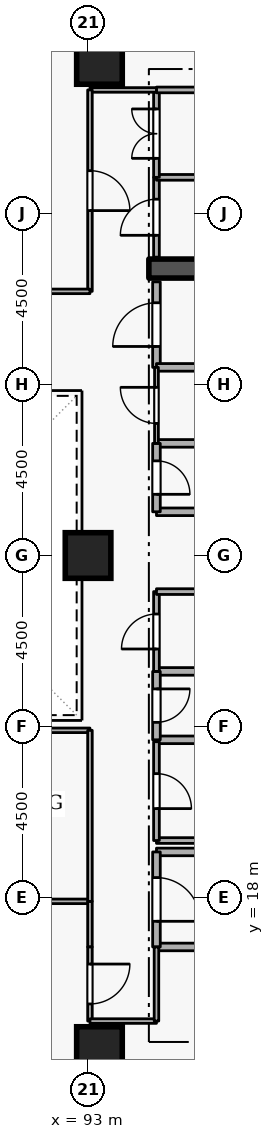
"""IFC4 building model, lengths in metres.
Left out: names, types, materials, properties, quantities, classifications, styles, units other than length and angle.
Written with IfcOpenShell. Run it as: python <this file> out.ifc"""

import sys

from ifc_helpers import new_model, si_unit, direction, frame, frame_2d, origin, origin_2d, place, context, subcontext, project, spatial, rectangle, extrude, element, fill, save


model = new_model("IFC4")
c1 = context("Model", 3, precision=1e-05, world=origin(), true_north=direction((0.0, 1.0)))
c2 = subcontext(c1, "Body", "Model", "MODEL_VIEW")
j1 = project(units=[si_unit("LENGTHUNIT", "METRE"), si_unit("PLANEANGLEUNIT", "RADIAN")], contexts=[c1])
p1 = place(None, origin())
s1 = spatial("IfcSite", under=j1, at=p1, CompositionType="ELEMENT")
p2 = place(p1, origin())
s2 = spatial("IfcBuilding", under=s1, at=p2, CompositionType="ELEMENT")
p3 = place(p2, frame((0.0, 0.0, 134.1)))
s3 = spatial("IfcBuildingStorey", under=s2, at=p3, CompositionType="ELEMENT", Elevation=134.1)
p4 = place(p3, frame((94.6, 34.55, 0.0), z_axis=(0.0, 0.0, 1.0), x_axis=(1.0, 0.0, 0.0)))
e1 = element("IfcWall", 1, at=p4, inside=s3, PredefinedType="SHEAR", context=c2, shape_type="SweptSolid", body=[
    extrude(rectangle(XDim=5.8, YDim=0.5, at=frame_2d((2.9, 0.0))), origin(), (0.0, 0.0, 1.0), 3.6),
])
for number, where, z_axis, x_axis in (
    (2, (93.3, 14.0, 0.0), (0.0, 0.0, 1.0), (1.0, 0.0, 0.0)),
    (3, (93.3, 40.0, 0.0), (0.0, 0.0, 1.0), (1.0, 0.0, 0.0)),
    (4, (93.0, 27.0, 0.0), (0.0, 0.0, 1.0), (1.0, 0.0, 0.0)),
):
    element("IfcColumn", number, at=place(p3, frame(where, z_axis=z_axis, x_axis=x_axis)), inside=s3, PredefinedType="COLUMN", context=c2, shape_type="SweptSolid", body=[
        extrude(rectangle(XDim=1.2, YDim=1.2, at=origin_2d()), origin(), (0.0, 0.0, 1.0), 3.6),
    ])
p5 = place(p3, frame((94.8, 16.7, 0.0), z_axis=(0.0, 0.0, 1.0), x_axis=(1.0, 0.0, 0.0)))
e5 = element("IfcWall", 5, at=p5, inside=s3, PredefinedType="STANDARD", context=c2, shape_type="SweptSolid", body=[
    extrude(rectangle(XDim=5.7, YDim=0.2, at=frame_2d((2.85, 0.0))), origin(), (0.0, 0.0, 1.0), 3.34),
])
p6 = place(p3, frame((97.1, 19.2, 0.0), z_axis=(0.0, 0.0, 1.0), x_axis=(-1.0, 0.0, 0.0)))
e6 = element("IfcWall", 6, at=p6, inside=s3, PredefinedType="STANDARD", context=c2, shape_type="SweptSolid", body=[
    extrude(rectangle(XDim=2.3, YDim=0.2, at=frame_2d((1.15, 0.0))), origin(), (0.0, 0.0, 1.0), 2.545),
])
p7 = place(p3, frame((94.8, 19.2, 0.0), z_axis=(0.0, 0.0, 1.0), x_axis=(0.0, -1.0, 0.0)))
e7 = element("IfcWall", 7, at=p7, inside=s3, PredefinedType="STANDARD", context=c2, shape_type="SweptSolid", body=[
    extrude(rectangle(XDim=2.5, YDim=0.2, at=frame_2d((1.25, 0.0))), origin(), (0.0, 0.0, 1.0), 3.34),
])
p8 = place(p7, frame((0.675, 0.0, 0.0)))
e8 = element("IfcOpeningElement", 8, at=p8, cuts=e7, PredefinedType="OPENING", context=c2, shape_type="SweptSolid", body=[
    extrude(rectangle(XDim=1.15, YDim=2.1, at=frame_2d((0.575, 1.05))), frame((0.0, 0.11, 0.0), z_axis=(0.0, -1.0, 0.0), x_axis=(1.0, 0.0, 0.0)), (0.0, 0.0, 1.0), 0.22),
])
for number, where, z_axis, x_axis in (
    (9, (94.8, 28.15, 0.0), (0.0, 0.0, 1.0), (1.0, 0.0, 0.0)),
    (10, (96.85, 29.95, 0.0), (0.0, 0.0, 1.0), (-1.0, 0.0, 0.0)),
):
    element("IfcWall", number, at=place(p3, frame(where, z_axis=z_axis, x_axis=x_axis)), inside=s3, PredefinedType="STANDARD", context=c2, shape_type="SweptSolid", body=[
        extrude(rectangle(XDim=2.05, YDim=0.2, at=frame_2d((1.025, 0.0))), origin(), (0.0, 0.0, 1.0), 3.34),
    ])
p9 = place(p3, frame((94.8, 29.95, 0.0), z_axis=(0.0, 0.0, 1.0), x_axis=(0.0, -1.0, 0.0)))
e11 = element("IfcWall", 11, at=p9, inside=s3, PredefinedType="STANDARD", context=c2, shape_type="SweptSolid", body=[
    extrude(rectangle(XDim=1.8, YDim=0.2, at=frame_2d((0.9, 0.0))), origin(), (0.0, 0.0, 1.0), 3.34),
])
p10 = place(p9, frame((0.46, 0.0, 0.0)))
e12 = element("IfcOpeningElement", 12, at=p10, cuts=e11, PredefinedType="OPENING", context=c2, shape_type="SweptSolid", body=[
    extrude(rectangle(XDim=0.88, YDim=2.04, at=frame_2d((0.44, 1.02))), frame((0.0, 0.11, 0.0), z_axis=(0.0, -1.0, 0.0), x_axis=(1.0, 0.0, 0.0)), (0.0, 0.0, 1.0), 0.22),
])
for number, where, z_axis, x_axis in (
    (13, (94.8, 22.15, 0.0), (0.0, 0.0, 1.0), (1.0, 0.0, 0.0)),
    (14, (96.85, 23.95, 0.0), (0.0, 0.0, 1.0), (-1.0, 0.0, 0.0)),
):
    element("IfcWall", number, at=place(p3, frame(where, z_axis=z_axis, x_axis=x_axis)), inside=s3, PredefinedType="STANDARD", context=c2, shape_type="SweptSolid", body=[
        extrude(rectangle(XDim=2.05, YDim=0.2, at=frame_2d((1.025, 0.0))), origin(), (0.0, 0.0, 1.0), 3.34),
    ])
p11 = place(p3, frame((94.8, 23.95, 0.0), z_axis=(0.0, 0.0, 1.0), x_axis=(0.0, -1.0, 0.0)))
e15 = element("IfcWall", 15, at=p11, inside=s3, PredefinedType="STANDARD", context=c2, shape_type="SweptSolid", body=[
    extrude(rectangle(XDim=1.8, YDim=0.2, at=frame_2d((0.9, 0.0))), origin(), (0.0, 0.0, 1.0), 3.34),
])
p12 = place(p11, frame((0.46, 0.0, 0.0)))
e16 = element("IfcOpeningElement", 16, at=p12, cuts=e15, PredefinedType="OPENING", context=c2, shape_type="SweptSolid", body=[
    extrude(rectangle(XDim=0.88, YDim=2.04, at=frame_2d((0.44, 1.02))), frame((0.0, 0.11, 0.0), z_axis=(0.0, -1.0, 0.0), x_axis=(1.0, 0.0, 0.0)), (0.0, 0.0, 1.0), 0.22),
])
p13 = place(p3, frame((94.8, 31.95, 0.0), z_axis=(0.0, 0.0, 1.0), x_axis=(0.0, 1.0, 0.0)))
e17 = element("IfcWall", 17, at=p13, inside=s3, PredefinedType="STANDARD", context=c2, shape_type="SweptSolid", body=[
    extrude(rectangle(XDim=2.25, YDim=0.2, at=frame_2d((1.125, 0.0))), origin(), (0.0, 0.0, 1.0), 3.34),
])
p14 = place(p13, frame((0.55, 0.0, 0.0)))
e18 = element("IfcOpeningElement", 18, at=p14, cuts=e17, PredefinedType="OPENING", context=c2, shape_type="SweptSolid", body=[
    extrude(rectangle(XDim=1.15, YDim=2.1, at=frame_2d((0.575, 1.05))), frame((0.0, 0.11, 0.0), z_axis=(0.0, -1.0, 0.0), x_axis=(1.0, 0.0, 0.0)), (0.0, 0.0, 1.0), 0.22),
])
p15 = place(p3, frame((96.85, 31.95, 0.0), z_axis=(0.0, 0.0, 1.0), x_axis=(-1.0, 0.0, 0.0)))
e19 = element("IfcWall", 19, at=p15, inside=s3, PredefinedType="STANDARD", context=c2, shape_type="SweptSolid", body=[
    extrude(rectangle(XDim=2.05, YDim=0.2, at=frame_2d((1.025, 0.0))), origin(), (0.0, 0.0, 1.0), 3.34),
])
p16 = place(p3, frame((94.8, 19.5, 0.0), z_axis=(0.0, 0.0, 1.0), x_axis=(1.0, 0.0, 0.0)))
e20 = element("IfcWall", 20, at=p16, inside=s3, PredefinedType="PARTITIONING", context=c2, shape_type="SweptSolid", body=[
    extrude(rectangle(XDim=2.05, YDim=0.15, at=frame_2d((1.025, 0.0))), origin(), (0.0, 0.0, 1.0), 2.545),
])
p17 = place(p3, frame((94.8, 22.1, 0.0), z_axis=(0.0, 0.0, 1.0), x_axis=(0.0, -1.0, 0.0)))
e21 = element("IfcWall", 21, at=p17, inside=s3, PredefinedType="PARTITIONING", context=c2, shape_type="SweptSolid", body=[
    extrude(rectangle(XDim=2.6, YDim=0.15, at=frame_2d((1.3, 0.0))), origin(), (0.0, 0.0, 1.0), 3.34),
])
p18 = place(p17, frame((0.84, 0.0, 0.0)))
e22 = element("IfcOpeningElement", 22, at=p18, cuts=e21, PredefinedType="OPENING", context=c2, shape_type="SweptSolid", body=[
    extrude(rectangle(XDim=0.92, YDim=2.08, at=frame_2d((0.46, 1.04))), frame((0.0, 0.085, 0.0), z_axis=(0.0, -1.0, 0.0), x_axis=(1.0, 0.0, 0.0)), (0.0, 0.0, 1.0), 0.17),
])
p19 = place(p3, frame((94.8, 23.95, 0.0), z_axis=(0.0, 0.0, 1.0), x_axis=(0.0, 1.0, 0.0)))
e23 = element("IfcWall", 23, at=p19, inside=s3, PredefinedType="PARTITIONING", context=c2, shape_type="SweptSolid", body=[
    extrude(rectangle(XDim=2.1, YDim=0.15, at=frame_2d((1.05, 0.0))), origin(), (0.0, 0.0, 1.0), 3.34),
])
p20 = place(p19, frame((0.59, 0.0, 0.0)))
e24 = element("IfcOpeningElement", 24, at=p20, cuts=e23, PredefinedType="OPENING", context=c2, shape_type="SweptSolid", body=[
    extrude(rectangle(XDim=0.92, YDim=2.08, at=frame_2d((0.46, 1.04))), frame((0.0, 0.085, 0.0), z_axis=(0.0, -1.0, 0.0), x_axis=(1.0, 0.0, 0.0)), (0.0, 0.0, 1.0), 0.17),
])
p21 = place(p3, frame((94.8, 26.05, 0.0), z_axis=(0.0, 0.0, 1.0), x_axis=(1.0, 0.0, 0.0)))
e25 = element("IfcWall", 25, at=p21, inside=s3, PredefinedType="PARTITIONING", context=c2, shape_type="SweptSolid", body=[
    extrude(rectangle(XDim=2.05, YDim=0.15, at=frame_2d((1.025, 0.0))), origin(), (0.0, 0.0, 1.0), 3.34),
])
p22 = place(p3, frame((94.8, 29.95, 0.0), z_axis=(0.0, 0.0, 1.0), x_axis=(0.0, 1.0, 0.0)))
e26 = element("IfcWall", 26, at=p22, inside=s3, PredefinedType="PARTITIONING", context=c2, shape_type="SweptSolid", body=[
    extrude(rectangle(XDim=2.0, YDim=0.1, at=frame_2d((1.0, 0.0))), origin(), (0.0, 0.0, 1.0), 3.34),
])
p23 = place(p22, frame((0.525, 0.0, 0.0)))
e27 = element("IfcOpeningElement", 27, at=p23, cuts=e26, PredefinedType="OPENING", context=c2, shape_type="SweptSolid", body=[
    extrude(rectangle(XDim=0.95, YDim=2.1, at=frame_2d((0.475, 1.05))), frame((0.0, 0.06, 0.0), z_axis=(0.0, -1.0, 0.0), x_axis=(1.0, 0.0, 0.0)), (0.0, 0.0, 1.0), 0.12),
])
p24 = place(p3, frame((94.8, 34.85, 0.0), z_axis=(0.0, 0.0, 1.0), x_axis=(0.0, 1.0, 0.0)))
e28 = element("IfcWall", 28, at=p24, inside=s3, PredefinedType="PARTITIONING", context=c2, shape_type="SweptSolid", body=[
    extrude(rectangle(XDim=2.1, YDim=0.15, at=frame_2d((1.05, 0.0))), origin(), (0.0, 0.0, 1.0), 3.34),
])
p25 = place(p24, frame((0.575, 0.0, 0.0)))
e29 = element("IfcOpeningElement", 29, at=p25, cuts=e28, PredefinedType="OPENING", context=c2, shape_type="SweptSolid", body=[
    extrude(rectangle(XDim=0.95, YDim=2.1, at=frame_2d((0.475, 1.05))), frame((0.0, 0.085, 0.0), z_axis=(0.0, -1.0, 0.0), x_axis=(1.0, 0.0, 0.0)), (0.0, 0.0, 1.0), 0.17),
])
p26 = place(p3, frame((94.8, 36.95, 0.0), z_axis=(0.0, 0.0, 1.0), x_axis=(1.0, 0.0, 0.0)))
e30 = element("IfcWall", 30, at=p26, inside=s3, PredefinedType="PARTITIONING", context=c2, shape_type="SweptSolid", body=[
    extrude(rectangle(XDim=5.65, YDim=0.15, at=frame_2d((2.825, 0.0))), origin(), (0.0, 0.0, 1.0), 3.34),
])
p27 = place(p3, frame((94.8, 36.95, 0.0), z_axis=(0.0, 0.0, 1.0), x_axis=(0.0, 1.0, 0.0)))
e31 = element("IfcWall", 31, at=p27, inside=s3, PredefinedType="PARTITIONING", context=c2, shape_type="SweptSolid", body=[
    extrude(rectangle(XDim=2.3, YDim=0.15, at=frame_2d((1.15, 0.0))), origin(), (0.0, 0.0, 1.0), 3.34),
])
p28 = place(p27, frame((0.5, 0.0, 0.0)))
e32 = element("IfcOpeningElement", 32, at=p28, cuts=e31, PredefinedType="OPENING", context=c2, shape_type="SweptSolid", body=[
    extrude(rectangle(XDim=1.3, YDim=2.12, at=frame_2d((0.65, 1.06))), frame((0.0, 0.085, 0.0), z_axis=(0.0, -1.0, 0.0), x_axis=(1.0, 0.0, 0.0)), (0.0, 0.0, 1.0), 0.17),
])
p29 = place(p3, frame((94.8, 39.25, 0.0), z_axis=(0.0, 0.0, 1.0), x_axis=(1.0, 0.0, 0.0)))
e33 = element("IfcWall", 33, at=p29, inside=s3, PredefinedType="PARTITIONING", context=c2, shape_type="SweptSolid", body=[
    extrude(rectangle(XDim=5.65, YDim=0.15, at=frame_2d((2.825, 0.0))), origin(), (0.0, 0.0, 1.0), 3.34),
])
p30 = place(p3, frame((88.5, 17.9, 0.0), z_axis=(0.0, 0.0, 1.0), x_axis=(1.0, 0.0, 0.0)))
e34 = element("IfcWall", 34, at=p30, inside=s3, PredefinedType="PARTITIONING", context=c2, shape_type="SweptSolid", body=[
    extrude(rectangle(XDim=4.55, YDim=0.12, at=frame_2d((2.275, 0.0))), origin(), (0.0, 0.0, 1.0), 3.34),
])
p31 = place(p3, frame((93.05, 17.9, 0.0), z_axis=(0.0, 0.0, 1.0), x_axis=(0.0, -1.0, 0.0)))
e35 = element("IfcWall", 35, at=p31, inside=s3, PredefinedType="PARTITIONING", context=c2, shape_type="SweptSolid", body=[
    extrude(rectangle(XDim=1.2, YDim=0.12, at=frame_2d((0.6, 0.0))), origin(), (0.0, 0.0, 1.0), 3.34),
])
p32 = place(p3, frame((93.05, 16.7, 0.0), z_axis=(0.0, 0.0, 1.0), x_axis=(0.0, -1.0, 0.0)))
e36 = element("IfcWall", 36, at=p32, inside=s3, PredefinedType="PARTITIONING", context=c2, shape_type="SweptSolid", body=[
    extrude(rectangle(XDim=1.95, YDim=0.12, at=frame_2d((0.975, 0.0))), origin(), (0.0, 0.0, 1.0), 3.34),
])
p33 = place(p32, frame((0.45, 0.0, 0.0)))
e37 = element("IfcOpeningElement", 37, at=p33, cuts=e36, PredefinedType="OPENING", context=c2, shape_type="SweptSolid", body=[
    extrude(rectangle(XDim=1.05, YDim=2.1, at=frame_2d((0.525, 1.05))), frame((0.0, 0.07, 0.0), z_axis=(0.0, -1.0, 0.0), x_axis=(1.0, 0.0, 0.0)), (0.0, 0.0, 1.0), 0.14),
])
p34 = place(p3, frame((93.05, 14.75, 0.0), z_axis=(0.0, 0.0, 1.0), x_axis=(1.0, 0.0, 0.0)))
e38 = element("IfcWall", 38, at=p34, inside=s3, PredefinedType="PARTITIONING", context=c2, shape_type="SweptSolid", body=[
    extrude(rectangle(XDim=1.75, YDim=0.12, at=frame_2d((0.875, 0.0))), origin(), (0.0, 0.0, 1.0), 3.34),
])
p35 = place(p3, frame((94.8, 14.75, 0.0), z_axis=(0.0, 0.0, 1.0), x_axis=(0.0, 1.0, 0.0)))
e39 = element("IfcWall", 39, at=p35, inside=s3, PredefinedType="PARTITIONING", context=c2, shape_type="SweptSolid", body=[
    extrude(rectangle(XDim=1.95, YDim=0.12, at=frame_2d((0.975, 0.0))), origin(), (0.0, 0.0, 1.0), 3.34),
])
p36 = place(p3, frame((83.95, 22.4, 0.0), z_axis=(0.0, 0.0, 1.0), x_axis=(1.0, 0.0, 0.0)))
e40 = element("IfcWall", 40, at=p36, inside=s3, PredefinedType="PARTITIONING", context=c2, shape_type="SweptSolid", body=[
    extrude(rectangle(XDim=9.1, YDim=0.12, at=frame_2d((4.55, 0.0))), origin(), (0.0, 0.0, 1.0), 3.34),
])
p37 = place(p3, frame((93.05, 22.4, 0.0), z_axis=(0.0, 0.0, 1.0), x_axis=(0.0, -1.0, 0.0)))
e41 = element("IfcWall", 41, at=p37, inside=s3, PredefinedType="PARTITIONING", context=c2, shape_type="SweptSolid", body=[
    extrude(rectangle(XDim=4.5, YDim=0.12, at=frame_2d((2.25, 0.0))), origin(), (0.0, 0.0, 1.0), 3.34),
])
p38 = place(p3, frame((94.8, 39.25, 0.0), z_axis=(0.0, 0.0, 1.0), x_axis=(-1.0, 0.0, 0.0)))
e42 = element("IfcWall", 42, at=p38, inside=s3, PredefinedType="PARTITIONING", context=c2, shape_type="SweptSolid", body=[
    extrude(rectangle(XDim=1.75, YDim=0.12, at=frame_2d((0.875, 0.0))), origin(), (0.0, 0.0, 1.0), 3.34),
])
p39 = place(p3, frame((93.05, 39.25, 0.0), z_axis=(0.0, 0.0, 1.0), x_axis=(0.0, -1.0, 0.0)))
e43 = element("IfcWall", 43, at=p39, inside=s3, PredefinedType="PARTITIONING", context=c2, shape_type="SweptSolid", body=[
    extrude(rectangle(XDim=5.3, YDim=0.12, at=frame_2d((2.65, 0.0))), origin(), (0.0, 0.0, 1.0), 3.34),
])
p40 = place(p39, frame((2.125, 0.0, 0.0)))
e44 = element("IfcOpeningElement", 44, at=p40, cuts=e43, PredefinedType="OPENING", context=c2, shape_type="SweptSolid", body=[
    extrude(rectangle(XDim=1.05, YDim=2.1, at=frame_2d((0.525, 1.05))), frame((0.0, 0.07, 0.0), z_axis=(0.0, -1.0, 0.0), x_axis=(1.0, 0.0, 0.0)), (0.0, 0.0, 1.0), 0.14),
])
p41 = place(p3, frame((93.05, 33.95, 0.0), z_axis=(0.0, 0.0, 1.0), x_axis=(-1.0, 0.0, 0.0)))
e45 = element("IfcWall", 45, at=p41, inside=s3, PredefinedType="PARTITIONING", context=c2, shape_type="SweptSolid", body=[
    extrude(rectangle(XDim=2.95, YDim=0.12, at=frame_2d((1.475, 0.0))), origin(), (0.0, 0.0, 1.0), 3.34),
])
p42 = place(p8, origin())
e46 = element("IfcDoor", 46, at=p42, inside=s3, OperationType="SINGLE_SWING_RIGHT", PredefinedType="DOOR", context=c2, shape_type="SweptSolid", body=[
    extrude(rectangle(XDim=1.15, YDim=2.1, at=frame_2d((0.575, 1.05))), frame((0.0, 0.025, 0.0), z_axis=(0.0, -1.0, 0.0), x_axis=(1.0, 0.0, 0.0)), (0.0, 0.0, 1.0), 0.05),
])
fill(e8, e46)
p43 = place(p10, origin())
e47 = element("IfcDoor", 47, at=p43, inside=s3, OperationType="SINGLE_SWING_RIGHT", PredefinedType="DOOR", context=c2, shape_type="SweptSolid", body=[
    extrude(rectangle(XDim=0.88, YDim=2.04, at=frame_2d((0.44, 1.02))), frame((0.0, 0.025, 0.0), z_axis=(0.0, -1.0, 0.0), x_axis=(1.0, 0.0, 0.0)), (0.0, 0.0, 1.0), 0.05),
])
fill(e12, e47)
p44 = place(p12, origin())
e48 = element("IfcDoor", 48, at=p44, inside=s3, OperationType="SINGLE_SWING_LEFT", PredefinedType="DOOR", context=c2, shape_type="SweptSolid", body=[
    extrude(rectangle(XDim=0.88, YDim=2.04, at=frame_2d((0.44, 1.02))), frame((0.0, 0.025, 0.0), z_axis=(0.0, -1.0, 0.0), x_axis=(1.0, 0.0, 0.0)), (0.0, 0.0, 1.0), 0.05),
])
fill(e16, e48)
p45 = place(p18, origin())
e49 = element("IfcDoor", 49, at=p45, inside=s3, OperationType="SINGLE_SWING_RIGHT", PredefinedType="DOOR", context=c2, shape_type="SweptSolid", body=[
    extrude(rectangle(XDim=0.92, YDim=2.08, at=frame_2d((0.46, 1.04))), frame((0.0, 0.025, 0.0), z_axis=(0.0, -1.0, 0.0), x_axis=(1.0, 0.0, 0.0)), (0.0, 0.0, 1.0), 0.05),
])
fill(e22, e49)
p46 = place(p20, origin())
e50 = element("IfcDoor", 50, at=p46, inside=s3, OperationType="SINGLE_SWING_LEFT", PredefinedType="DOOR", context=c2, shape_type="SweptSolid", body=[
    extrude(rectangle(XDim=0.92, YDim=2.08, at=frame_2d((0.46, 1.04))), frame((0.0, 0.025, 0.0), z_axis=(0.0, -1.0, 0.0), x_axis=(1.0, 0.0, 0.0)), (0.0, 0.0, 1.0), 0.05),
])
fill(e24, e50)
p47 = place(p23, origin())
e51 = element("IfcDoor", 51, at=p47, inside=s3, OperationType="SINGLE_SWING_RIGHT", PredefinedType="DOOR", context=c2, shape_type="SweptSolid", body=[
    extrude(rectangle(XDim=0.95, YDim=2.1, at=frame_2d((0.475, 1.05))), frame((0.0, 0.025, 0.0), z_axis=(0.0, -1.0, 0.0), x_axis=(1.0, 0.0, 0.0)), (0.0, 0.0, 1.0), 0.05),
])
fill(e27, e51)
p48 = place(p14, origin())
e52 = element("IfcDoor", 52, at=p48, inside=s3, OperationType="SINGLE_SWING_LEFT", PredefinedType="DOOR", context=c2, shape_type="SweptSolid", body=[
    extrude(rectangle(XDim=1.15, YDim=2.1, at=frame_2d((0.575, 1.05))), frame((0.0, 0.025, 0.0), z_axis=(0.0, -1.0, 0.0), x_axis=(1.0, 0.0, 0.0)), (0.0, 0.0, 1.0), 0.05),
])
fill(e18, e52)
p49 = place(p25, origin())
e53 = element("IfcDoor", 53, at=p49, inside=s3, OperationType="SINGLE_SWING_LEFT", PredefinedType="DOOR", context=c2, shape_type="SweptSolid", body=[
    extrude(rectangle(XDim=0.95, YDim=2.1, at=frame_2d((0.475, 1.05))), frame((0.0, 0.025, 0.0), z_axis=(0.0, -1.0, 0.0), x_axis=(1.0, 0.0, 0.0)), (0.0, 0.0, 1.0), 0.05),
])
fill(e29, e53)
p50 = place(p28, origin())
e54 = element("IfcDoor", 54, at=p50, inside=s3, OperationType="DOUBLE_DOOR_SINGLE_SWING", PredefinedType="DOOR", context=c2, shape_type="SweptSolid", body=[
    extrude(rectangle(XDim=1.3, YDim=2.12, at=frame_2d((0.65, 1.06))), frame((0.0, 0.025, 0.0), z_axis=(0.0, -1.0, 0.0), x_axis=(1.0, 0.0, 0.0)), (0.0, 0.0, 1.0), 0.05),
])
fill(e32, e54)
p51 = place(p33, origin())
e55 = element("IfcDoor", 55, at=p51, inside=s3, OperationType="SINGLE_SWING_LEFT", PredefinedType="DOOR", context=c2, shape_type="SweptSolid", body=[
    extrude(rectangle(XDim=1.05, YDim=2.1, at=frame_2d((0.525, 1.05))), frame((0.0, 0.025, 0.0), z_axis=(0.0, -1.0, 0.0), x_axis=(1.0, 0.0, 0.0)), (0.0, 0.0, 1.0), 0.05),
])
fill(e37, e55)
p52 = place(p40, origin())
e56 = element("IfcDoor", 56, at=p52, inside=s3, OperationType="SINGLE_SWING_RIGHT", PredefinedType="DOOR", context=c2, shape_type="SweptSolid", body=[
    extrude(rectangle(XDim=1.05, YDim=2.1, at=frame_2d((0.525, 1.05))), frame((0.0, 0.025, 0.0), z_axis=(0.0, -1.0, 0.0), x_axis=(1.0, 0.0, 0.0)), (0.0, 0.0, 1.0), 0.05),
])
fill(e44, e56)
save(model, sys.argv[1])
